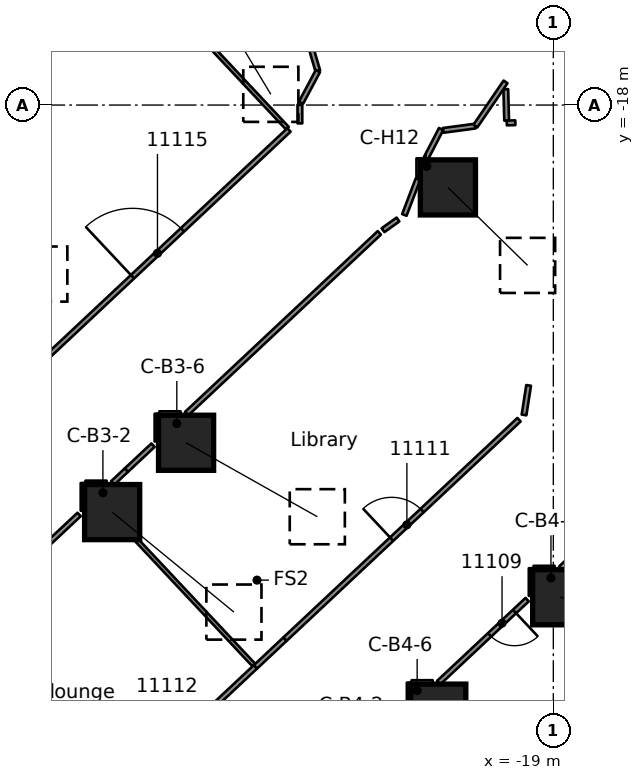
"""IFC4 building model, lengths in metres.
Left out: names, types, materials, properties, quantities, classifications, styles, units other than length and angle.
Written with IfcOpenShell. Run it as: python <this file> out.ifc"""

import sys

from ifc_helpers import new_model, si_unit, direction, frame, frame_2d, origin, origin_2d, place, context, subcontext, project, spatial, rectangle, extrude, element, fill, save


model = new_model("IFC4")
c1 = context("Model", 3, precision=1e-05, world=origin(), true_north=direction((0.0, 1.0)))
c2 = subcontext(c1, "Body", "Model", "MODEL_VIEW")
j1 = project(units=[si_unit("LENGTHUNIT", "METRE"), si_unit("PLANEANGLEUNIT", "RADIAN")], contexts=[c1])
p1 = place(None, origin())
s1 = spatial("IfcSite", under=j1, at=p1, CompositionType="ELEMENT")
p2 = place(p1, origin())
s2 = spatial("IfcBuilding", under=s1, at=p2, CompositionType="ELEMENT")
p3 = place(p2, frame((0.0, 0.0, 54.8)))
s3 = spatial("IfcBuildingStorey", under=s2, at=p3, CompositionType="ELEMENT", Elevation=54.8)
p4 = place(p3, frame((-35.3, -19.811, 0.583), z_axis=(0.584399803244, -0.552712392749, 0.594126148953), x_axis=(0.687135400222, 0.726529381211, 0.0)))
e1 = element("IfcColumn", 1, at=p4, inside=s3, PredefinedType="COLUMN", context=c2, shape_type="SweptSolid", body=[
    extrude(rectangle(XDim=1.45, YDim=1.45, at=origin_2d()), origin(), (0.0, 0.0, 1.0), 4.769),
])
p5 = place(p3, frame((-30.609, -28.71, 0.601), z_axis=(0.640539472129, -0.526030167731, 0.559465322681), x_axis=(0.634647743871, 0.77280155357, 0.0)))
e2 = element("IfcColumn", 2, at=p5, inside=s3, PredefinedType="COLUMN", context=c2, shape_type="SweptSolid", body=[
    extrude(rectangle(XDim=1.45, YDim=1.45, at=origin_2d()), origin(), (0.0, 0.0, 1.0), 5.002),
])
p6 = place(p3, frame((-28.664, -26.886, 0.591), z_axis=(0.710018665714, -0.400138488717, 0.579450329351), x_axis=(0.490962919212, 0.871180470373, 0.0)))
e3 = element("IfcColumn", 3, at=p6, inside=s3, PredefinedType="COLUMN", context=c2, shape_type="SweptSolid", body=[
    extrude(rectangle(XDim=1.45, YDim=1.45, at=origin_2d()), origin(), (0.0, 0.0, 1.0), 4.864),
])
p7 = place(p3, frame((-22.028, -33.961, 0.609), z_axis=(0.803445484043, -0.245005157385, 0.542630470049), x_axis=(0.291682692006, 0.956515136934, 0.0)))
e4 = element("IfcColumn", 4, at=p7, inside=s3, PredefinedType="COLUMN", context=c2, shape_type="SweptSolid", body=[
    extrude(rectangle(XDim=1.45, YDim=1.45, at=origin_2d()), origin(), (0.0, 0.0, 1.0), 5.127),
])
p8 = place(p3, frame((-18.819, -30.951, 0.588), z_axis=(0.787390274069, -0.197377882685, 0.584002164147), x_axis=(0.243150442879, 0.969988588659, 0.0)))
e5 = element("IfcColumn", 5, at=p8, inside=s3, PredefinedType="COLUMN", context=c2, shape_type="SweptSolid", body=[
    extrude(rectangle(XDim=1.45, YDim=1.45, at=origin_2d()), origin(), (0.0, 0.0, 1.0), 4.834),
])
p9 = place(p3, frame((-21.774, -20.167, 0.508), z_axis=(0.501160289027, -0.490424057431, 0.712967466716), x_axis=(0.699409692761, 0.714720981693, 0.0)))
e6 = element("IfcColumn", 6, at=p9, inside=s3, PredefinedType="COLUMN", context=c2, shape_type="SweptSolid", body=[
    extrude(rectangle(XDim=1.45, YDim=1.45, at=origin_2d()), origin(), (0.0, 0.0, 1.0), 4.184),
])
p10 = place(p3, frame((-28.054, -15.021, 0.53), z_axis=(0.376150796059, -0.626275485165, 0.682854007315), x_axis=(0.857260034443, 0.514883708566, 0.0)))
e7 = element("IfcColumn", 7, at=p10, inside=s3, PredefinedType="COLUMN", context=c2, shape_type="SweptSolid", body=[
    extrude(rectangle(XDim=1.45, YDim=1.45, at=origin_2d()), origin(), (0.0, 0.0, 1.0), 4.306),
])
p11 = place(p3, frame((-20.251, -17.583, 0.0), z_axis=(0.0, 0.0, 1.0), x_axis=(0.02780812319, -0.999613279366, 0.0)))
e8 = element("IfcWall", 8, at=p11, inside=s3, PredefinedType="PARTITIONING", context=c2, shape_type="SweptSolid", body=[
    extrude(rectangle(XDim=0.825, YDim=0.125, at=frame_2d((0.413, 0.0))), origin(), (0.0, 0.0, 1.0), 3.58),
])
p12 = place(p3, frame((-31.274, -28.052, 0.0), z_axis=(0.0, 0.0, 1.0), x_axis=(0.684140939344, -0.729349830406, 0.0)))
e9 = element("IfcWall", 9, at=p12, inside=s3, PredefinedType="PARTITIONING", context=c2, shape_type="SweptSolid", body=[
    extrude(rectangle(XDim=6.421, YDim=0.1, at=frame_2d((3.21, 0.0))), origin(), (0.0, 0.0, 1.0), 3.58),
])
p13 = place(p3, frame((-36.969, -6.912, 0.0), z_axis=(0.0, 0.0, 1.0), x_axis=(0.684114300723, -0.729374816913, 0.0)))
e10 = element("IfcWall", 10, at=p13, inside=s3, PredefinedType="PARTITIONING", context=c2, shape_type="SweptSolid", body=[
    extrude(rectangle(XDim=16.037, YDim=0.1, at=frame_2d((8.018, 0.0))), origin(), (0.0, 0.0, 1.0), 3.58),
])
p14 = place(p3, frame((-25.451, -16.24, 0.0), z_axis=(0.0, 0.0, 1.0), x_axis=(0.282063930775, -0.959395611286, 0.0)))
e11 = element("IfcWall", 11, at=p14, inside=s3, PredefinedType="PARTITIONING", context=c2, shape_type="SweptSolid", body=[
    extrude(rectangle(XDim=0.904, YDim=0.125, at=frame_2d((0.452, 0.0))), origin(), (0.0, 0.0, 1.0), 3.58),
])
p15 = place(p3, frame((-21.9, -18.667, 0.0), z_axis=(0.0, 0.0, 1.0), x_axis=(0.991100480157, 0.133115882725, 0.0)))
e12 = element("IfcWall", 12, at=p15, inside=s3, PredefinedType="PARTITIONING", context=c2, shape_type="SweptSolid", body=[
    extrude(rectangle(XDim=0.856, YDim=0.125, at=frame_2d((0.428, 0.0))), origin(), (0.0, 0.0, 1.0), 3.58),
])
p16 = place(p3, frame((-22.73, -33.196, 0.0), z_axis=(0.0, 0.0, 1.0), x_axis=(1.0, 0.0, 0.0)))
e13 = element("IfcWall", 13, at=p16, inside=s3, PredefinedType="PARTITIONING", context=c2, shape_type="SweptSolid", body=[
    extrude(rectangle(XDim=0.556, YDim=0.125, at=frame_2d((0.278, 0.0))), origin(), (0.0, 0.0, 1.0), 3.58),
])
p17 = place(p3, frame((-19.52, -30.186, 0.0), z_axis=(0.0, 0.0, 1.0), x_axis=(1.0, 0.0, 0.0)))
e14 = element("IfcWall", 14, at=p17, inside=s3, PredefinedType="PARTITIONING", context=c2, shape_type="SweptSolid", body=[
    extrude(rectangle(XDim=0.555, YDim=0.125, at=frame_2d((0.277, 0.0))), origin(), (0.0, 0.0, 1.0), 3.58),
])
p18 = place(p3, frame((-31.311, -27.945, 0.0), z_axis=(0.0, 0.0, 1.0), x_axis=(1.0, 0.0, 0.0)))
e15 = element("IfcWall", 15, at=p18, inside=s3, PredefinedType="PARTITIONING", context=c2, shape_type="SweptSolid", body=[
    extrude(rectangle(XDim=0.557, YDim=0.125, at=frame_2d((0.279, 0.0))), origin(), (0.0, 0.0, 1.0), 3.58),
])
p19 = place(p3, frame((-29.366, -26.121, 0.0), z_axis=(0.0, 0.0, 1.0), x_axis=(1.0, 0.0, 0.0)))
e16 = element("IfcWall", 16, at=p19, inside=s3, PredefinedType="PARTITIONING", context=c2, shape_type="SweptSolid", body=[
    extrude(rectangle(XDim=0.557, YDim=0.125, at=frame_2d((0.278, 0.0))), origin(), (0.0, 0.0, 1.0), 3.58),
])
p20 = place(p3, frame((-20.225, -18.471, 0.0), z_axis=(0.0, 0.0, 1.0), x_axis=(0.999661382022, 0.026021554413, 0.0)))
e17 = element("IfcWall", 17, at=p20, inside=s3, PredefinedType="PARTITIONING", context=c2, shape_type="SweptSolid", body=[
    extrude(rectangle(XDim=0.225, YDim=0.125, at=frame_2d((0.113, 0.0))), origin(), (0.0, 0.0, 1.0), 3.58),
])
p21 = place(p3, frame((-23.481, -21.293, 0.0), z_axis=(0.0, 0.0, 1.0), x_axis=(0.813494420515, 0.581572719263, 0.0)))
e18 = element("IfcWall", 18, at=p21, inside=s3, PredefinedType="PARTITIONING", context=c2, shape_type="SweptSolid", body=[
    extrude(rectangle(XDim=0.483, YDim=0.125, at=frame_2d((0.242, 0.0))), origin(), (0.0, 0.0, 1.0), 3.58),
])
p22 = place(p3, frame((-30.236, -27.607, 0.0), z_axis=(0.0, 0.0, 1.0), x_axis=(0.730201947911, 0.683231377548, 0.0)))
e19 = element("IfcWall", 19, at=p22, inside=s3, PredefinedType="PARTITIONING", context=c2, shape_type="SweptSolid", body=[
    extrude(rectangle(XDim=0.962, YDim=0.125, at=frame_2d((0.481, 0.0))), origin(), (0.0, 0.0, 1.0), 3.58),
])
p23 = place(p3, frame((-19.689, -31.014, 0.0), z_axis=(0.0, 0.0, 1.0), x_axis=(-0.72947037737, -0.684012403791, 0.0)))
e20 = element("IfcWall", 20, at=p23, inside=s3, PredefinedType="PARTITIONING", context=c2, shape_type="SweptSolid", body=[
    extrude(rectangle(XDim=3.19, YDim=0.125, at=frame_2d((1.595, 0.0))), origin(), (0.0, 0.0, 1.0), 3.58),
])
p24 = place(p23, frame((0.456, 0.0, 0.0)))
e21 = element("IfcOpeningElement", 21, at=p24, cuts=e20, PredefinedType="OPENING", context=c2, shape_type="SweptSolid", body=[
    extrude(rectangle(XDim=0.9, YDim=2.1, at=frame_2d((0.45, 1.05))), frame((0.0, 0.073, 0.0), z_axis=(0.0, -1.0, 0.0), x_axis=(1.0, 0.0, 0.0)), (0.0, 0.0, 1.0), 0.145),
])
p25 = place(p3, frame((-18.807, -30.186, 0.0), z_axis=(0.0, 0.0, 1.0), x_axis=(0.729339012688, 0.684152471728, 0.0)))
e22 = element("IfcWall", 22, at=p25, inside=s3, PredefinedType="PARTITIONING", context=c2, shape_type="SweptSolid", body=[
    extrude(rectangle(XDim=3.112, YDim=0.125, at=frame_2d((1.556, 0.0))), origin(), (0.0, 0.0, 1.0), 3.58),
])
p26 = place(p3, frame((-32.218, -37.828, 0.0), z_axis=(0.0, 0.0, 1.0), x_axis=(0.729395805056, 0.68409192333, 0.0)))
e23 = element("IfcWall", 23, at=p26, inside=s3, PredefinedType="PARTITIONING", context=c2, shape_type="SweptSolid", body=[
    extrude(rectangle(XDim=7.377, YDim=0.125, at=frame_2d((3.689, 0.0))), origin(), (0.0, 0.0, 1.0), 3.58),
])
p27 = place(p26, frame((3.206, 0.0, 0.0)))
e24 = element("IfcOpeningElement", 24, at=p27, cuts=e23, PredefinedType="OPENING", context=c2, shape_type="SweptSolid", body=[
    extrude(rectangle(XDim=1.0, YDim=2.1, at=frame_2d((0.5, 1.05))), frame((0.0, 0.073, 0.0), z_axis=(0.0, -1.0, 0.0), x_axis=(1.0, 0.0, 0.0)), (0.0, 0.0, 1.0), 0.145),
])
p28 = place(p3, frame((-26.063, -32.055, 0.0), z_axis=(0.0, 0.0, 1.0), x_axis=(0.729480399327, 0.684001715639, 0.0)))
e25 = element("IfcWall", 25, at=p28, inside=s3, PredefinedType="PARTITIONING", context=c2, shape_type="SweptSolid", body=[
    extrude(rectangle(XDim=8.444, YDim=0.125, at=frame_2d((4.222, 0.0))), origin(), (0.0, 0.0, 1.0), 3.58),
])
p29 = place(p28, frame((3.85, 0.0, 0.0)))
e26 = element("IfcOpeningElement", 26, at=p29, cuts=e25, PredefinedType="OPENING", context=c2, shape_type="SweptSolid", body=[
    extrude(rectangle(XDim=1.1, YDim=2.1, at=frame_2d((0.55, 1.05))), frame((0.0, 0.073, 0.0), z_axis=(0.0, -1.0, 0.0), x_axis=(1.0, 0.0, 0.0)), (0.0, 0.0, 1.0), 0.145),
])
p30 = place(p3, frame((-26.836, -32.781, 0.0), z_axis=(0.0, 0.0, 1.0), x_axis=(0.728861997168, 0.684660637896, 0.0)))
e27 = element("IfcWall", 27, at=p30, inside=s3, PredefinedType="PARTITIONING", context=c2, shape_type="SweptSolid", body=[
    extrude(rectangle(XDim=1.061, YDim=0.125, at=frame_2d((0.53, 0.0))), origin(), (0.0, 0.0, 1.0), 3.58),
])
p31 = place(p3, frame((-37.138, -34.08, 0.0), z_axis=(0.0, 0.0, 1.0), x_axis=(0.729416485857, 0.684069872279, 0.0)))
e28 = element("IfcWall", 28, at=p31, inside=s3, PredefinedType="PARTITIONING", context=c2, shape_type="SweptSolid", body=[
    extrude(rectangle(XDim=7.758, YDim=0.125, at=frame_2d((3.879, 0.0))), origin(), (0.0, 0.0, 1.0), 3.58),
])
p32 = place(p3, frame((-28.651, -26.121, 0.0), z_axis=(0.0, 0.0, 1.0), x_axis=(0.729302874573, 0.684190994635, 0.0)))
e29 = element("IfcWall", 29, at=p32, inside=s3, PredefinedType="PARTITIONING", context=c2, shape_type="SweptSolid", body=[
    extrude(rectangle(XDim=6.954, YDim=0.125, at=frame_2d((3.477, 0.0))), origin(), (0.0, 0.0, 1.0), 3.58),
])
p33 = place(p3, frame((-30.596, -27.945, 0.0), z_axis=(0.0, 0.0, 1.0), x_axis=(0.728765825334, 0.68476300413, 0.0)))
e30 = element("IfcWall", 30, at=p33, inside=s3, PredefinedType="PARTITIONING", context=c2, shape_type="SweptSolid", body=[
    extrude(rectangle(XDim=0.494, YDim=0.125, at=frame_2d((0.247, 0.0))), origin(), (0.0, 0.0, 1.0), 3.58),
])
p34 = place(p3, frame((-39.52, -31.378, 0.0), z_axis=(0.0, 0.0, 1.0), x_axis=(0.729357865, 0.684132373713, 0.0)))
e31 = element("IfcWall", 31, at=p34, inside=s3, PredefinedType="PARTITIONING", context=c2, shape_type="SweptSolid", body=[
    extrude(rectangle(XDim=18.597, YDim=0.125, at=frame_2d((9.299, 0.0))), origin(), (0.0, 0.0, 1.0), 3.58),
])
p35 = place(p34, frame((12.952, 0.0, 0.0)))
e32 = element("IfcOpeningElement", 32, at=p35, cuts=e31, PredefinedType="OPENING", context=c2, shape_type="SweptSolid", body=[
    extrude(rectangle(XDim=1.8, YDim=2.1, at=frame_2d((0.9, 1.05))), frame((0.0, 0.073, 0.0), z_axis=(0.0, -1.0, 0.0), x_axis=(1.0, 0.0, 0.0)), (0.0, 0.0, 1.0), 0.145),
])
p36 = place(p34, frame((3.206, 0.0, 0.0)))
e33 = element("IfcOpeningElement", 33, at=p36, cuts=e31, PredefinedType="OPENING", context=c2, shape_type="SweptSolid", body=[
    extrude(rectangle(XDim=1.8, YDim=2.1, at=frame_2d((0.9, 1.05))), frame((0.0, 0.073, 0.0), z_axis=(0.0, -1.0, 0.0), x_axis=(1.0, 0.0, 0.0)), (0.0, 0.0, 1.0), 0.145),
])
p37 = place(p3, frame((-21.953, -18.632, 0.0), z_axis=(0.0, 0.0, 1.0), x_axis=(-0.460802463587, -0.887502726504, 0.0)))
e34 = element("IfcWall", 34, at=p37, inside=s3, PredefinedType="PARTITIONING", context=c2, shape_type="SweptSolid", body=[
    extrude(rectangle(XDim=0.866, YDim=0.125, at=frame_2d((0.433, 0.0))), origin(), (0.0, 0.0, 1.0), 3.58),
])
p38 = place(p3, frame((-25.196, -17.107, 0.0), z_axis=(0.0, 0.0, 1.0), x_axis=(-0.470668857684, -0.882309937837, 0.0)))
e35 = element("IfcWall", 35, at=p38, inside=s3, PredefinedType="PARTITIONING", context=c2, shape_type="SweptSolid", body=[
    extrude(rectangle(XDim=0.943, YDim=0.125, at=frame_2d((0.472, 0.0))), origin(), (0.0, 0.0, 1.0), 3.58),
])
p39 = place(p3, frame((-21.051, -18.553, 0.0), z_axis=(0.0, 0.0, 1.0), x_axis=(0.564192476138, 0.82564329457, 0.0)))
e36 = element("IfcWall", 36, at=p39, inside=s3, PredefinedType="PARTITIONING", context=c2, shape_type="SweptSolid", body=[
    extrude(rectangle(XDim=1.407, YDim=0.125, at=frame_2d((0.704, 0.0))), origin(), (0.0, 0.0, 1.0), 3.58),
])
p40 = place(p3, frame((-22.92, -20.891, 0.0), z_axis=(0.0, 0.0, 1.0), x_axis=(0.35597518747, 0.934495407108, 0.0)))
e37 = element("IfcWall", 37, at=p40, inside=s3, PredefinedType="PARTITIONING", context=c2, shape_type="SweptSolid", body=[
    extrude(rectangle(XDim=1.008, YDim=0.125, at=frame_2d((0.504, 0.0))), origin(), (0.0, 0.0, 1.0), 3.58),
])
p41 = place(p3, frame((-19.771, -26.154, 0.0), z_axis=(0.0, 0.0, 1.0), x_axis=(0.153969677757, 0.988075573188, 0.0)))
e38 = element("IfcWall", 38, at=p41, inside=s3, PredefinedType="PARTITIONING", context=c2, shape_type="SweptSolid", body=[
    extrude(rectangle(XDim=0.786, YDim=0.125, at=frame_2d((0.393, 0.0))), origin(), (0.0, 0.0, 1.0), 3.58),
])
p42 = place(p3, frame((-19.583, -30.914, 0.0), z_axis=(0.0, 0.0, 1.0), x_axis=(0.0, 1.0, 0.0)))
e39 = element("IfcWall", 39, at=p42, inside=s3, PredefinedType="PARTITIONING", context=c2, shape_type="SweptSolid", body=[
    extrude(rectangle(XDim=0.728, YDim=0.125, at=frame_2d((0.364, 0.0))), origin(), (0.0, 0.0, 1.0), 3.58),
])
p43 = place(p3, frame((-22.539, -19.891, 0.0), z_axis=(0.0, 0.0, 1.0), x_axis=(0.0, 1.0, 0.0)))
e40 = element("IfcWall", 40, at=p43, inside=s3, PredefinedType="PARTITIONING", context=c2, shape_type="SweptSolid", body=[
    extrude(rectangle(XDim=0.489, YDim=0.125, at=frame_2d((0.245, 0.0))), origin(), (0.0, 0.0, 1.0), 3.58),
])
p44 = place(p3, frame((-22.792, -33.924, 0.0), z_axis=(0.0, 0.0, 1.0), x_axis=(0.0, 1.0, 0.0)))
e41 = element("IfcWall", 41, at=p44, inside=s3, PredefinedType="PARTITIONING", context=c2, shape_type="SweptSolid", body=[
    extrude(rectangle(XDim=0.728, YDim=0.125, at=frame_2d((0.364, 0.0))), origin(), (0.0, 0.0, 1.0), 3.58),
])
p45 = place(p3, frame((-25.669, -18.482, 0.0), z_axis=(0.0, 0.0, 1.0), x_axis=(0.0, 1.0, 0.0)))
e42 = element("IfcWall", 42, at=p45, inside=s3, PredefinedType="PARTITIONING", context=c2, shape_type="SweptSolid", body=[
    extrude(rectangle(XDim=0.488, YDim=0.125, at=frame_2d((0.244, 0.0))), origin(), (0.0, 0.0, 1.0), 3.58),
])
p46 = place(p3, frame((-29.429, -26.851, 0.0), z_axis=(0.0, 0.0, 1.0), x_axis=(0.0, 1.0, 0.0)))
e43 = element("IfcWall", 43, at=p46, inside=s3, PredefinedType="PARTITIONING", context=c2, shape_type="SweptSolid", body=[
    extrude(rectangle(XDim=0.73, YDim=0.125, at=frame_2d((0.365, 0.0))), origin(), (0.0, 0.0, 1.0), 3.58),
])
p47 = place(p3, frame((-31.374, -28.674, 0.0), z_axis=(0.0, 0.0, 1.0), x_axis=(0.0, 1.0, 0.0)))
e44 = element("IfcWall", 44, at=p47, inside=s3, PredefinedType="PARTITIONING", context=c2, shape_type="SweptSolid", body=[
    extrude(rectangle(XDim=0.729, YDim=0.125, at=frame_2d((0.365, 0.0))), origin(), (0.0, 0.0, 1.0), 3.58),
])
p48 = place(p24, origin())
e45 = element("IfcDoor", 45, at=p48, inside=s3, OperationType="SINGLE_SWING_LEFT", PredefinedType="DOOR", context=c2, shape_type="SweptSolid", body=[
    extrude(rectangle(XDim=0.9, YDim=2.1, at=frame_2d((0.45, 1.05))), frame((0.0, 0.025, 0.0), z_axis=(0.0, -1.0, 0.0), x_axis=(1.0, 0.0, 0.0)), (0.0, 0.0, 1.0), 0.05),
])
fill(e21, e45)
p49 = place(p29, origin())
e46 = element("IfcDoor", 46, at=p49, inside=s3, OperationType="SINGLE_SWING_RIGHT", PredefinedType="DOOR", context=c2, shape_type="SweptSolid", body=[
    extrude(rectangle(XDim=1.1, YDim=2.1, at=frame_2d((0.55, 1.05))), frame((0.0, 0.025, 0.0), z_axis=(0.0, -1.0, 0.0), x_axis=(1.0, 0.0, 0.0)), (0.0, 0.0, 1.0), 0.05),
])
fill(e26, e46)
p50 = place(p35, origin())
e47 = element("IfcDoor", 47, at=p50, inside=s3, OperationType="DOUBLE_DOOR_SINGLE_SWING", PredefinedType="DOOR", context=c2, shape_type="SweptSolid", body=[
    extrude(rectangle(XDim=1.8, YDim=2.1, at=frame_2d((0.9, 1.05))), frame((0.0, 0.025, 0.0), z_axis=(0.0, -1.0, 0.0), x_axis=(1.0, 0.0, 0.0)), (0.0, 0.0, 1.0), 0.05),
])
fill(e32, e47)
save(model, sys.argv[1])
